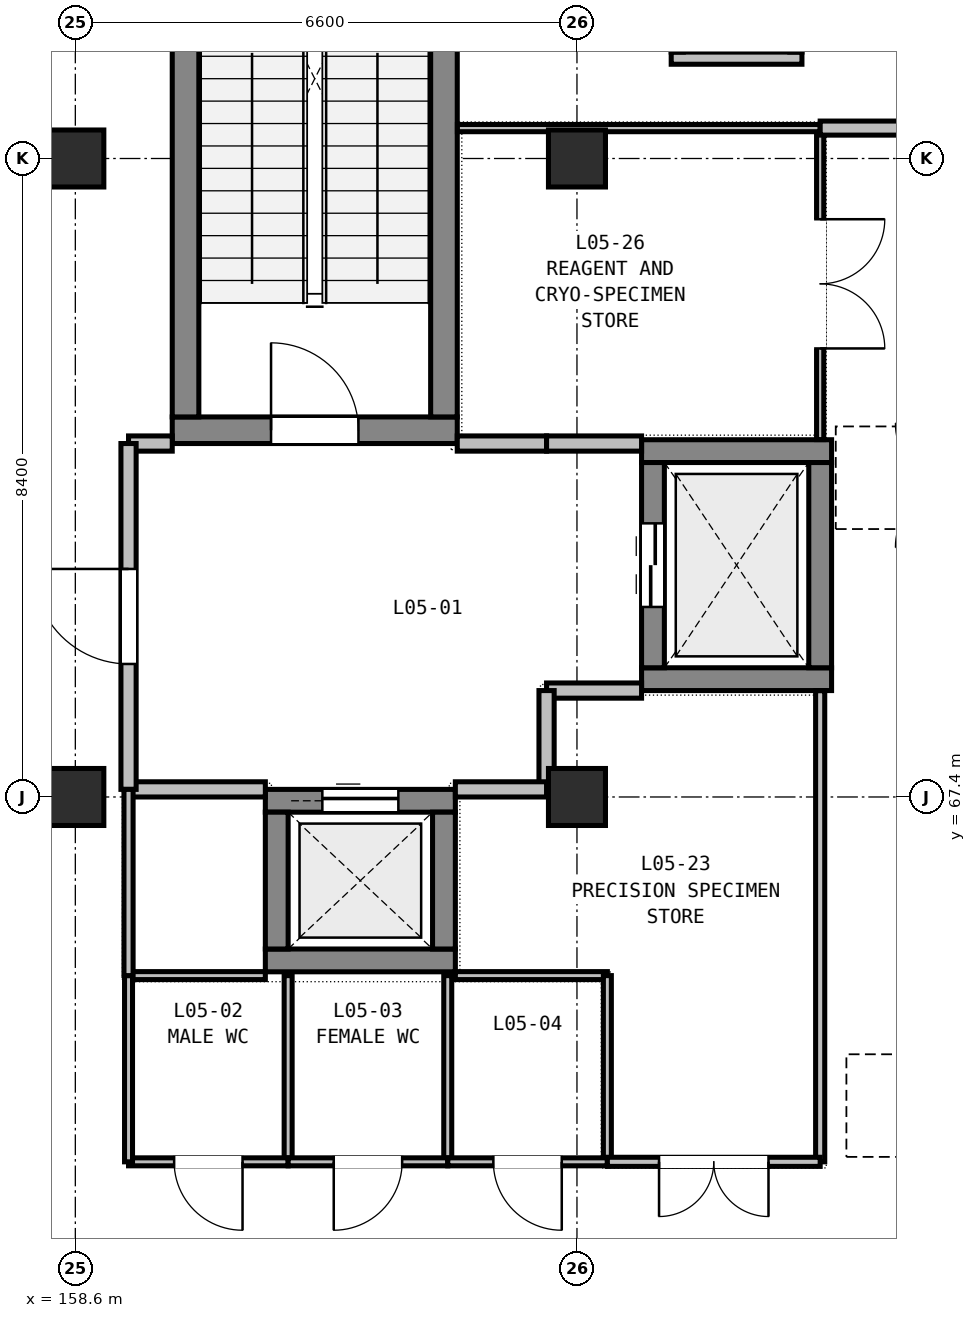
"""IFC4 building model, lengths in metres.
Left out: names, types, materials, properties, quantities, classifications, styles, units other than length and angle.
Written with IfcOpenShell. Run it as: python <this file> out.ifc"""

import sys

from ifc_helpers import new_model, si_unit, direction, frame, frame_2d, origin, origin_2d, place, context, subcontext, project, spatial, rectangle, extrude, element, fill, save


model = new_model("IFC4")
c1 = context("Model", 3, precision=1e-05, world=origin(), true_north=direction((0.0, 1.0)))
c2 = subcontext(c1, "Body", "Model", "MODEL_VIEW")
j1 = project(units=[si_unit("LENGTHUNIT", "METRE"), si_unit("PLANEANGLEUNIT", "RADIAN")], contexts=[c1])
p1 = place(None, origin())
s1 = spatial("IfcSite", under=j1, at=p1, CompositionType="ELEMENT")
p2 = place(p1, origin())
s2 = spatial("IfcBuilding", under=s1, at=p2, CompositionType="ELEMENT")
p3 = place(p2, frame((0.0, 0.0, 24.0)))
s3 = spatial("IfcBuildingStorey", under=s2, at=p3, CompositionType="ELEMENT", Elevation=24.0)
for number, where, z_axis, x_axis in (
    (1, (158.6, 67.4, 0.0), (0.0, 0.0, 1.0), (1.0, 0.0, 0.0)),
    (2, (158.6, 75.8, 0.0), (0.0, 0.0, 1.0), (1.0, 0.0, 0.0)),
    (3, (165.2, 67.4, 0.0), (0.0, 0.0, 1.0), (1.0, 0.0, 0.0)),
    (4, (165.2, 75.8, 0.0), (0.0, 0.0, 1.0), (1.0, 0.0, 0.0)),
):
    element("IfcColumn", number, at=place(p3, frame(where, z_axis=z_axis, x_axis=x_axis)), inside=s3, PredefinedType="COLUMN", context=c2, shape_type="SweptSolid", body=[
        extrude(rectangle(XDim=0.75, YDim=0.75, at=origin_2d()), origin(), (0.0, 0.0, 1.0), 4.5),
    ])
p4 = place(p3, frame((159.875, 72.225, 0.0), z_axis=(0.0, 0.0, 1.0), x_axis=(1.0, 0.0, 0.0)))
e5 = element("IfcWall", 5, at=p4, inside=s3, PredefinedType="SHEAR", context=c2, shape_type="SweptSolid", body=[
    extrude(rectangle(XDim=3.75, YDim=0.35, at=frame_2d((1.875, 0.0))), origin(), (0.0, 0.0, 1.0), 4.5),
])
p5 = place(p4, frame((1.3, 0.0, 0.0)))
e6 = element("IfcOpeningElement", 6, at=p5, cuts=e5, PredefinedType="OPENING", context=c2, shape_type="SweptSolid", body=[
    extrude(rectangle(XDim=1.15, YDim=2.15, at=frame_2d((0.575, 1.075))), frame((0.0, 0.185, 0.0), z_axis=(0.0, -1.0, 0.0), x_axis=(1.0, 0.0, 0.0)), (0.0, 0.0, 1.0), 0.37),
])
for number, where, z_axis, x_axis in (
    (7, (160.05, 72.4, 0.0), (0.0, 0.0, 1.0), (0.0, 1.0, 0.0)),
    (8, (163.45, 72.4, 0.0), (0.0, 0.0, 1.0), (0.0, 1.0, 0.0)),
):
    element("IfcWall", number, at=place(p3, frame(where, z_axis=z_axis, x_axis=x_axis)), inside=s3, PredefinedType="SHEAR", context=c2, shape_type="SweptSolid", body=[
        extrude(rectangle(XDim=7.375, YDim=0.35, at=frame_2d((3.688, 0.0))), origin(), (0.0, 0.0, 1.0), 4.5),
    ])
for number, where, z_axis, x_axis in (
    (9, (166.05, 68.95, 0.0), (0.0, 0.0, 1.0), (1.0, 0.0, 0.0)),
    (10, (166.05, 71.95, 0.0), (0.0, 0.0, 1.0), (1.0, 0.0, 0.0)),
):
    element("IfcWall", number, at=place(p3, frame(where, z_axis=z_axis, x_axis=x_axis)), inside=s3, PredefinedType="SHEAR", context=c2, shape_type="SweptSolid", body=[
        extrude(rectangle(XDim=2.5, YDim=0.3, at=frame_2d((1.25, 0.0))), origin(), (0.0, 0.0, 1.0), 4.5),
    ])
p6 = place(p3, frame((166.2, 69.1, 0.0), z_axis=(0.0, 0.0, 1.0), x_axis=(0.0, 1.0, 0.0)))
e11 = element("IfcWall", 11, at=p6, inside=s3, PredefinedType="SHEAR", context=c2, shape_type="SweptSolid", body=[
    extrude(rectangle(XDim=2.7, YDim=0.3, at=frame_2d((1.35, 0.0))), origin(), (0.0, 0.0, 1.0), 4.5),
])
p7 = place(p6, frame((0.8, 0.0, 0.0)))
e12 = element("IfcOpeningElement", 12, at=p7, cuts=e11, PredefinedType="OPENING", context=c2, shape_type="SweptSolid", body=[
    extrude(rectangle(XDim=1.1, YDim=2.1, at=frame_2d((0.55, 1.05))), frame((0.0, 0.16, 0.0), z_axis=(0.0, -1.0, 0.0), x_axis=(1.0, 0.0, 0.0)), (0.0, 0.0, 1.0), 0.32),
])
p8 = place(p3, frame((168.4, 69.1, 0.0), z_axis=(0.0, 0.0, 1.0), x_axis=(0.0, 1.0, 0.0)))
e13 = element("IfcWall", 13, at=p8, inside=s3, PredefinedType="SHEAR", context=c2, shape_type="SweptSolid", body=[
    extrude(rectangle(XDim=2.7, YDim=0.3, at=frame_2d((1.35, 0.0))), origin(), (0.0, 0.0, 1.0), 4.5),
])
p9 = place(p3, frame((161.1, 65.25, 0.0), z_axis=(0.0, 0.0, 1.0), x_axis=(1.0, 0.0, 0.0)))
e14 = element("IfcWall", 14, at=p9, inside=s3, PredefinedType="SHEAR", context=c2, shape_type="SweptSolid", body=[
    extrude(rectangle(XDim=2.5, YDim=0.3, at=frame_2d((1.25, 0.0))), origin(), (0.0, 0.0, 1.0), 4.5),
])
p10 = place(p3, frame((161.1, 67.35, 0.0), z_axis=(0.0, 0.0, 1.0), x_axis=(1.0, 0.0, 0.0)))
e15 = element("IfcWall", 15, at=p10, inside=s3, PredefinedType="SHEAR", context=c2, shape_type="SweptSolid", body=[
    extrude(rectangle(XDim=2.5, YDim=0.3, at=frame_2d((1.25, 0.0))), origin(), (0.0, 0.0, 1.0), 4.5),
])
p11 = place(p10, frame((0.75, 0.0, 0.0)))
e16 = element("IfcOpeningElement", 16, at=p11, cuts=e15, PredefinedType="OPENING", context=c2, shape_type="SweptSolid", body=[
    extrude(rectangle(XDim=1.0, YDim=2.1, at=frame_2d((0.5, 1.05))), frame((0.0, 0.16, 0.0), z_axis=(0.0, -1.0, 0.0), x_axis=(1.0, 0.0, 0.0)), (0.0, 0.0, 1.0), 0.32),
])
for number, where, z_axis, x_axis in (
    (17, (161.25, 65.4, 0.0), (0.0, 0.0, 1.0), (0.0, 1.0, 0.0)),
    (18, (163.45, 65.4, 0.0), (0.0, 0.0, 1.0), (0.0, 1.0, 0.0)),
):
    element("IfcWall", number, at=place(p3, frame(where, z_axis=z_axis, x_axis=x_axis)), inside=s3, PredefinedType="SHEAR", context=c2, shape_type="SweptSolid", body=[
        extrude(rectangle(XDim=1.8, YDim=0.3, at=frame_2d((0.9, 0.0))), origin(), (0.0, 0.0, 1.0), 4.5),
    ])
p12 = place(p3, frame((166.44, 77.12, 0.0), z_axis=(0.0, 0.0, 1.0), x_axis=(1.0, 0.0, 0.0)))
e19 = element("IfcWall", 19, at=p12, inside=s3, PredefinedType="PARTITIONING", context=c2, shape_type="SweptSolid", body=[
    extrude(rectangle(XDim=1.72, YDim=0.16, at=frame_2d((0.86, 0.0))), origin(), (0.0, 0.0, 1.0), 4.215),
])
p13 = place(p3, frame((159.3, 72.05, 0.0), z_axis=(0.0, 0.0, 1.0), x_axis=(1.0, 0.0, 0.0)))
e20 = element("IfcWall", 20, at=p13, inside=s3, PredefinedType="PARTITIONING", context=c2, shape_type="SweptSolid", body=[
    extrude(rectangle(XDim=0.575, YDim=0.2, at=frame_2d((0.288, 0.0))), origin(), (0.0, 0.0, 1.0), 4.215),
])
p14 = place(p3, frame((163.625, 72.05, 0.0), z_axis=(0.0, 0.0, 1.0), x_axis=(1.0, 0.0, 0.0)))
e21 = element("IfcWall", 21, at=p14, inside=s3, PredefinedType="PARTITIONING", context=c2, shape_type="SweptSolid", body=[
    extrude(rectangle(XDim=1.175, YDim=0.2, at=frame_2d((0.587, 0.0))), origin(), (0.0, 0.0, 1.0), 4.215),
])
for number, where, z_axis, x_axis in (
    (22, (164.8, 72.05, 0.0), (0.0, 0.0, 1.0), (1.0, 0.0, 0.0)),
    (23, (166.05, 68.8, 0.0), (0.0, 0.0, 1.0), (-1.0, 0.0, 0.0)),
):
    element("IfcWall", number, at=place(p3, frame(where, z_axis=z_axis, x_axis=x_axis)), inside=s3, PredefinedType="PARTITIONING", context=c2, shape_type="SweptSolid", body=[
        extrude(rectangle(XDim=1.25, YDim=0.2, at=frame_2d((0.625, 0.0))), origin(), (0.0, 0.0, 1.0), 3.735),
    ])
p15 = place(p3, frame((164.8, 68.8, 0.0), z_axis=(0.0, 0.0, 1.0), x_axis=(0.0, -1.0, 0.0)))
e24 = element("IfcWall", 24, at=p15, inside=s3, PredefinedType="PARTITIONING", context=c2, shape_type="SweptSolid", body=[
    extrude(rectangle(XDim=1.3, YDim=0.2, at=frame_2d((0.65, 0.0))), origin(), (0.0, 0.0, 1.0), 3.885),
])
p16 = place(p3, frame((164.8, 67.5, 0.0), z_axis=(0.0, 0.0, 1.0), x_axis=(-1.0, 0.0, 0.0)))
e25 = element("IfcWall", 25, at=p16, inside=s3, PredefinedType="PARTITIONING", context=c2, shape_type="SweptSolid", body=[
    extrude(rectangle(XDim=1.2, YDim=0.2, at=frame_2d((0.6, 0.0))), origin(), (0.0, 0.0, 1.0), 3.885),
])
p17 = place(p3, frame((161.1, 67.5, 0.0), z_axis=(0.0, 0.0, 1.0), x_axis=(-1.0, 0.0, 0.0)))
e26 = element("IfcWall", 26, at=p17, inside=s3, PredefinedType="PARTITIONING", context=c2, shape_type="SweptSolid", body=[
    extrude(rectangle(XDim=1.8, YDim=0.2, at=frame_2d((0.9, 0.0))), origin(), (0.0, 0.0, 1.0), 3.885),
])
p18 = place(p3, frame((159.3, 67.5, 0.0), z_axis=(0.0, 0.0, 1.0), x_axis=(0.0, 1.0, 0.0)))
e27 = element("IfcWall", 27, at=p18, inside=s3, PredefinedType="PARTITIONING", context=c2, shape_type="SweptSolid", body=[
    extrude(rectangle(XDim=4.55, YDim=0.2, at=frame_2d((2.275, 0.0))), origin(), (0.0, 0.0, 1.0), 3.885),
])
p19 = place(p18, frame((1.65, 0.0, 0.0)))
e28 = element("IfcOpeningElement", 28, at=p19, cuts=e27, PredefinedType="OPENING", context=c2, shape_type="SweptSolid", body=[
    extrude(rectangle(XDim=1.25, YDim=2.15, at=frame_2d((0.625, 1.075))), frame((0.0, 0.11, 0.0), z_axis=(0.0, -1.0, 0.0), x_axis=(1.0, 0.0, 0.0)), (0.0, 0.0, 1.0), 0.22),
])
p20 = place(p3, frame((159.3, 65.05, 0.0), z_axis=(0.0, 0.0, 1.0), x_axis=(1.0, 0.0, 0.0)))
e29 = element("IfcWall", 29, at=p20, inside=s3, PredefinedType="PARTITIONING", context=c2, shape_type="SweptSolid", body=[
    extrude(rectangle(XDim=1.8, YDim=0.105, at=frame_2d((0.9, 0.0))), origin(), (0.0, 0.0, 1.0), 4.215),
])
p21 = place(p3, frame((161.4, 65.05, 0.0), z_axis=(0.0, 0.0, 1.0), x_axis=(0.0, -1.0, 0.0)))
e30 = element("IfcWall", 30, at=p21, inside=s3, PredefinedType="PARTITIONING", context=c2, shape_type="SweptSolid", body=[
    extrude(rectangle(XDim=2.45, YDim=0.105, at=frame_2d((1.225, 0.0))), origin(), (0.0, 0.0, 1.0), 4.215),
])
p22 = place(p3, frame((161.4, 62.6, 0.0), z_axis=(0.0, 0.0, 1.0), x_axis=(-1.0, 0.0, 0.0)))
e31 = element("IfcWall", 31, at=p22, inside=s3, PredefinedType="PARTITIONING", context=c2, shape_type="SweptSolid", body=[
    extrude(rectangle(XDim=2.1, YDim=0.105, at=frame_2d((1.05, 0.0))), origin(), (0.0, 0.0, 1.0), 4.215),
])
p23 = place(p22, frame((0.6, 0.0, 0.0)))
e32 = element("IfcOpeningElement", 32, at=p23, cuts=e31, PredefinedType="OPENING", context=c2, shape_type="SweptSolid", body=[
    extrude(rectangle(XDim=0.9, YDim=2.02, at=frame_2d((0.45, 1.01))), frame((0.0, 0.062, 0.0), z_axis=(0.0, -1.0, 0.0), x_axis=(1.0, 0.0, 0.0)), (0.0, 0.0, 1.0), 0.125),
])
for number, where, z_axis, x_axis in (
    (33, (159.3, 62.6, 0.0), (0.0, 0.0, 1.0), (0.0, 1.0, 0.0)),
    (34, (163.5, 65.05, 0.0), (0.0, 0.0, 1.0), (0.0, -1.0, 0.0)),
):
    element("IfcWall", number, at=place(p3, frame(where, z_axis=z_axis, x_axis=x_axis)), inside=s3, PredefinedType="PARTITIONING", context=c2, shape_type="SweptSolid", body=[
        extrude(rectangle(XDim=2.45, YDim=0.105, at=frame_2d((1.225, 0.0))), origin(), (0.0, 0.0, 1.0), 4.215),
    ])
p24 = place(p3, frame((163.5, 62.6, 0.0), z_axis=(0.0, 0.0, 1.0), x_axis=(-1.0, 0.0, 0.0)))
e35 = element("IfcWall", 35, at=p24, inside=s3, PredefinedType="PARTITIONING", context=c2, shape_type="SweptSolid", body=[
    extrude(rectangle(XDim=2.1, YDim=0.105, at=frame_2d((1.05, 0.0))), origin(), (0.0, 0.0, 1.0), 4.215),
])
p25 = place(p24, frame((0.6, 0.0, 0.0)))
e36 = element("IfcOpeningElement", 36, at=p25, cuts=e35, PredefinedType="OPENING", context=c2, shape_type="SweptSolid", body=[
    extrude(rectangle(XDim=0.9, YDim=2.02, at=frame_2d((0.45, 1.01))), frame((0.0, 0.062, 0.0), z_axis=(0.0, -1.0, 0.0), x_axis=(1.0, 0.0, 0.0)), (0.0, 0.0, 1.0), 0.125),
])
p26 = place(p3, frame((163.6, 65.05, 0.0), z_axis=(0.0, 0.0, 1.0), x_axis=(1.0, 0.0, 0.0)))
e37 = element("IfcWall", 37, at=p26, inside=s3, PredefinedType="PARTITIONING", context=c2, shape_type="SweptSolid", body=[
    extrude(rectangle(XDim=2.0, YDim=0.105, at=frame_2d((1.0, 0.0))), origin(), (0.0, 0.0, 1.0), 3.735),
])
p27 = place(p3, frame((165.6, 65.05, 0.0), z_axis=(0.0, 0.0, 1.0), x_axis=(0.0, -1.0, 0.0)))
e38 = element("IfcWall", 38, at=p27, inside=s3, PredefinedType="PARTITIONING", context=c2, shape_type="SweptSolid", body=[
    extrude(rectangle(XDim=2.45, YDim=0.105, at=frame_2d((1.225, 0.0))), origin(), (0.0, 0.0, 1.0), 4.215),
])
p28 = place(p3, frame((165.6, 62.6, 0.0), z_axis=(0.0, 0.0, 1.0), x_axis=(-1.0, 0.0, 0.0)))
e39 = element("IfcWall", 39, at=p28, inside=s3, PredefinedType="PARTITIONING", context=c2, shape_type="SweptSolid", body=[
    extrude(rectangle(XDim=2.1, YDim=0.105, at=frame_2d((1.05, 0.0))), origin(), (0.0, 0.0, 1.0), 3.735),
])
p29 = place(p28, frame((0.6, 0.0, 0.0)))
e40 = element("IfcOpeningElement", 40, at=p29, cuts=e39, PredefinedType="OPENING", context=c2, shape_type="SweptSolid", body=[
    extrude(rectangle(XDim=0.9, YDim=2.02, at=frame_2d((0.45, 1.01))), frame((0.0, 0.062, 0.0), z_axis=(0.0, -1.0, 0.0), x_axis=(1.0, 0.0, 0.0)), (0.0, 0.0, 1.0), 0.125),
])
p30 = place(p3, frame((168.4, 68.798, 0.0), z_axis=(0.0, 0.0, 1.0), x_axis=(0.0, -1.0, 0.0)))
e41 = element("IfcWall", 41, at=p30, inside=s3, PredefinedType="PARTITIONING", context=c2, shape_type="SweptSolid", body=[
    extrude(rectangle(XDim=6.198, YDim=0.12, at=frame_2d((3.099, 0.0))), origin(), (0.0, 0.0, 1.0), 3.885),
])
p31 = place(p3, frame((168.4, 62.6, 0.0), z_axis=(0.0, 0.0, 1.0), x_axis=(-1.0, 0.0, 0.0)))
e42 = element("IfcWall", 42, at=p31, inside=s3, PredefinedType="PARTITIONING", context=c2, shape_type="SweptSolid", body=[
    extrude(rectangle(XDim=2.8, YDim=0.12, at=frame_2d((1.4, 0.0))), origin(), (0.0, 0.0, 1.0), 3.985),
])
p32 = place(p31, frame((0.68, 0.0, 0.0)))
e43 = element("IfcOpeningElement", 43, at=p32, cuts=e42, PredefinedType="OPENING", context=c2, shape_type="SweptSolid", body=[
    extrude(rectangle(XDim=1.44, YDim=2.14, at=frame_2d((0.72, 1.07))), frame((0.0, 0.07, 0.0), z_axis=(0.0, -1.0, 0.0), x_axis=(1.0, 0.0, 0.0)), (0.0, 0.0, 1.0), 0.14),
])
p33 = place(p3, frame((159.3, 65.05, 0.0), z_axis=(0.0, 0.0, 1.0), x_axis=(0.0, 1.0, 0.0)))
e44 = element("IfcWall", 44, at=p33, inside=s3, PredefinedType="PARTITIONING", context=c2, shape_type="SweptSolid", body=[
    extrude(rectangle(XDim=2.45, YDim=0.12, at=frame_2d((1.225, 0.0))), origin(), (0.0, 0.0, 1.0), 3.885),
])
p34 = place(p3, frame((168.4, 76.2, 0.0), z_axis=(0.0, 0.0, 1.0), x_axis=(0.0, -1.0, 0.0)))
e45 = element("IfcWall", 45, at=p34, inside=s3, PredefinedType="PARTITIONING", context=c2, shape_type="SweptSolid", body=[
    extrude(rectangle(XDim=4.098, YDim=0.095, at=frame_2d((2.049, 0.0))), origin(), (0.0, 0.0, 1.0), 3.885),
])
p35 = place(p34, frame((1.199, 0.0, 0.0)))
e46 = element("IfcOpeningElement", 46, at=p35, cuts=e45, PredefinedType="OPENING", context=c2, shape_type="SweptSolid", body=[
    extrude(rectangle(XDim=1.7, YDim=2.14, at=frame_2d((0.85, 1.07))), frame((0.0, 0.057, 0.0), z_axis=(0.0, -1.0, 0.0), x_axis=(1.0, 0.0, 0.0)), (0.0, 0.0, 1.0), 0.115),
])
p36 = place(p3, frame((163.627, 76.2, 0.0), z_axis=(0.0, 0.0, 1.0), x_axis=(1.0, 0.0, 0.0)))
e47 = element("IfcWall", 47, at=p36, inside=s3, PredefinedType="PARTITIONING", context=c2, shape_type="SweptSolid", body=[
    extrude(rectangle(XDim=4.773, YDim=0.095, at=frame_2d((2.386, 0.0))), origin(), (0.0, 0.0, 1.0), 3.735),
])
p37 = place(p3, frame((170.2, 76.2, 0.0), z_axis=(0.0, 0.0, 1.0), x_axis=(-1.0, 0.0, 0.0)))
e48 = element("IfcWall", 48, at=p37, inside=s3, PredefinedType="PARTITIONING", context=c2, shape_type="SweptSolid", body=[
    extrude(rectangle(XDim=1.8, YDim=0.185, at=frame_2d((0.9, 0.0))), origin(), (0.0, 0.0, 1.0), 3.985),
])
p38 = place(p5, origin())
e49 = element("IfcDoor", 49, at=p38, inside=s3, OperationType="SINGLE_SWING_LEFT", PredefinedType="DOOR", context=c2, shape_type="SweptSolid", body=[
    extrude(rectangle(XDim=1.15, YDim=2.15, at=frame_2d((0.575, 1.075))), frame((0.0, 0.025, 0.0), z_axis=(0.0, -1.0, 0.0), x_axis=(1.0, 0.0, 0.0)), (0.0, 0.0, 1.0), 0.05),
])
fill(e6, e49)
p39 = place(p7, origin())
e50 = element("IfcDoor", 50, at=p39, inside=s3, OperationType="DOUBLE_DOOR_SLIDING", PredefinedType="DOOR", context=c2, shape_type="SweptSolid", body=[
    extrude(rectangle(XDim=1.1, YDim=2.1, at=frame_2d((0.55, 1.05))), frame((0.0, 0.025, 0.0), z_axis=(0.0, -1.0, 0.0), x_axis=(1.0, 0.0, 0.0)), (0.0, 0.0, 1.0), 0.05),
])
fill(e12, e50)
p40 = place(p11, origin())
e51 = element("IfcDoor", 51, at=p40, inside=s3, OperationType="SLIDING_TO_LEFT", PredefinedType="DOOR", context=c2, shape_type="SweptSolid", body=[
    extrude(rectangle(XDim=1.0, YDim=2.1, at=frame_2d((0.5, 1.05))), frame((0.0, 0.025, 0.0), z_axis=(0.0, -1.0, 0.0), x_axis=(1.0, 0.0, 0.0)), (0.0, 0.0, 1.0), 0.05),
])
fill(e16, e51)
p41 = place(p19, origin())
e52 = element("IfcDoor", 52, at=p41, inside=s3, OperationType="SINGLE_SWING_RIGHT", PredefinedType="DOOR", context=c2, shape_type="SweptSolid", body=[
    extrude(rectangle(XDim=1.25, YDim=2.15, at=frame_2d((0.625, 1.075))), frame((0.0, 0.025, 0.0), z_axis=(0.0, -1.0, 0.0), x_axis=(1.0, 0.0, 0.0)), (0.0, 0.0, 1.0), 0.05),
])
fill(e28, e52)
p42 = place(p23, origin())
e53 = element("IfcDoor", 53, at=p42, inside=s3, OperationType="SINGLE_SWING_LEFT", PredefinedType="DOOR", context=c2, shape_type="SweptSolid", body=[
    extrude(rectangle(XDim=0.9, YDim=2.02, at=frame_2d((0.45, 1.01))), frame((0.0, 0.025, 0.0), z_axis=(0.0, -1.0, 0.0), x_axis=(1.0, 0.0, 0.0)), (0.0, 0.0, 1.0), 0.05),
])
fill(e32, e53)
p43 = place(p25, origin())
e54 = element("IfcDoor", 54, at=p43, inside=s3, OperationType="SINGLE_SWING_RIGHT", PredefinedType="DOOR", context=c2, shape_type="SweptSolid", body=[
    extrude(rectangle(XDim=0.9, YDim=2.02, at=frame_2d((0.45, 1.01))), frame((0.0, 0.025, 0.0), z_axis=(0.0, -1.0, 0.0), x_axis=(1.0, 0.0, 0.0)), (0.0, 0.0, 1.0), 0.05),
])
fill(e36, e54)
p44 = place(p29, origin())
e55 = element("IfcDoor", 55, at=p44, inside=s3, OperationType="SINGLE_SWING_LEFT", PredefinedType="DOOR", context=c2, shape_type="SweptSolid", body=[
    extrude(rectangle(XDim=0.9, YDim=2.02, at=frame_2d((0.45, 1.01))), frame((0.0, 0.025, 0.0), z_axis=(0.0, -1.0, 0.0), x_axis=(1.0, 0.0, 0.0)), (0.0, 0.0, 1.0), 0.05),
])
fill(e40, e55)
p45 = place(p32, origin())
e56 = element("IfcDoor", 56, at=p45, inside=s3, OperationType="DOUBLE_DOOR_SINGLE_SWING", PredefinedType="DOOR", context=c2, shape_type="SweptSolid", body=[
    extrude(rectangle(XDim=1.44, YDim=2.14, at=frame_2d((0.72, 1.07))), frame((0.0, 0.025, 0.0), z_axis=(0.0, -1.0, 0.0), x_axis=(1.0, 0.0, 0.0)), (0.0, 0.0, 1.0), 0.05),
])
fill(e43, e56)
p46 = place(p35, origin())
e57 = element("IfcDoor", 57, at=p46, inside=s3, OperationType="DOUBLE_DOOR_SINGLE_SWING", PredefinedType="DOOR", context=c2, shape_type="SweptSolid", body=[
    extrude(rectangle(XDim=1.7, YDim=2.14, at=frame_2d((0.85, 1.07))), frame((0.0, 0.025, 0.0), z_axis=(0.0, -1.0, 0.0), x_axis=(1.0, 0.0, 0.0)), (0.0, 0.0, 1.0), 0.05),
])
fill(e46, e57)
save(model, sys.argv[1])
